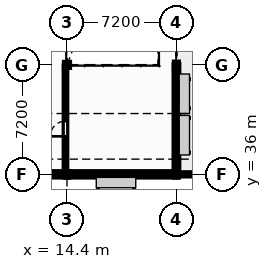
"""IFC4 building model, lengths in metres.
Left out: names, types, materials, properties, quantities, classifications, styles, units other than length and angle.
Written with IfcOpenShell. Run it as: python <this file> out.ifc"""

import sys

from ifc_helpers import new_model, si_unit, direction, frame, frame_2d, origin, origin_2d, place, context, subcontext, project, spatial, rectangle, hollow_circle, i_section, extrude, element, fill, save


model = new_model("IFC4")
c1 = context("Model", 3, precision=1e-05, world=origin(), true_north=direction((0.0, 1.0)))
c2 = subcontext(c1, "Body", "Model", "MODEL_VIEW")
j1 = project(units=[si_unit("LENGTHUNIT", "METRE"), si_unit("PLANEANGLEUNIT", "RADIAN")], contexts=[c1])
p1 = place(None, origin())
s1 = spatial("IfcSite", under=j1, at=p1, CompositionType="ELEMENT")
p2 = place(p1, origin())
s2 = spatial("IfcBuilding", under=s1, at=p2, CompositionType="ELEMENT")
p3 = place(p2, frame((0.0, 0.0, 16.52)))
s3 = spatial("IfcBuildingStorey", under=s2, at=p3, CompositionType="ELEMENT", Elevation=16.52)
p4 = place(p3, frame((14.4, 36.0, 0.0), z_axis=(0.0, 0.0, 1.0), x_axis=(1.0, 0.0, 0.0)))
e1 = element("IfcColumn", 1, at=p4, inside=s3, PredefinedType="COLUMN", context=c2, shape_type="SweptSolid", body=[
    extrude(i_section(OverallWidth=0.254, OverallDepth=0.356, WebThickness=0.01, FlangeThickness=0.018, at=origin_2d()), origin(), (0.0, 0.0, 1.0), 3.74),
])
p5 = place(p3, frame((14.4, 43.2, 0.0), z_axis=(0.0, 0.0, 1.0), x_axis=(1.0, 0.0, 0.0)))
e2 = element("IfcColumn", 2, at=p5, inside=s3, PredefinedType="COLUMN", context=c2, shape_type="SweptSolid", body=[
    extrude(hollow_circle(Radius=0.162, WallThickness=0.012, at=origin_2d()), origin(), (0.0, 0.0, 1.0), 3.74),
])
for number, where, z_axis, x_axis in (
    (3, (21.6, 36.0, 0.0), (0.0, 0.0, 1.0), (1.0, 0.0, 0.0)),
    (4, (21.6, 43.2, 0.0), (0.0, 0.0, 1.0), (1.0, 0.0, 0.0)),
):
    element("IfcColumn", number, at=place(p3, frame(where, z_axis=z_axis, x_axis=x_axis)), inside=s3, PredefinedType="COLUMN", context=c2, shape_type="SweptSolid", body=[
        extrude(i_section(OverallWidth=0.254, OverallDepth=0.356, WebThickness=0.01, FlangeThickness=0.018, at=origin_2d()), origin(), (0.0, 0.0, 1.0), 3.74),
    ])
p6 = place(p3, frame((21.6, 36.0, 0.0), z_axis=(0.0, 0.0, 1.0), x_axis=(0.0, 1.0, 0.0)))
e5 = element("IfcWall", 5, at=p6, inside=s3, PredefinedType="SOLIDWALL", context=c2, shape_type="SweptSolid", body=[
    extrude(rectangle(XDim=7.2, YDim=0.3, at=frame_2d((3.6, 0.0))), origin(), (0.0, 0.0, 1.0), 2.863),
])
p7 = place(p6, frame((1.6, 0.0, 0.643)))
e6 = element("IfcOpeningElement", 6, at=p7, cuts=e5, PredefinedType="OPENING", context=c2, shape_type="SweptSolid", body=[
    extrude(rectangle(XDim=1.95, YDim=2.1, at=frame_2d((0.975, 1.05))), frame((0.0, 0.16, 0.0), z_axis=(0.0, -1.0, 0.0), x_axis=(1.0, 0.0, 0.0)), (0.0, 0.0, 1.0), 0.32),
])
p8 = place(p6, frame((4.5, 0.0, 0.693)))
e7 = element("IfcOpeningElement", 7, at=p8, cuts=e5, PredefinedType="OPENING", context=c2, shape_type="SweptSolid", body=[
    extrude(rectangle(XDim=1.6, YDim=2.05, at=frame_2d((0.8, 1.025))), frame((0.0, 0.16, 0.0), z_axis=(0.0, -1.0, 0.0), x_axis=(1.0, 0.0, 0.0)), (0.0, 0.0, 1.0), 0.32),
])
p9 = place(p3, frame((7.2, 36.0, 0.0), z_axis=(0.0, 0.0, 1.0), x_axis=(1.0, 0.0, 0.0)))
e8 = element("IfcWall", 8, at=p9, inside=s3, PredefinedType="SOLIDWALL", context=c2, shape_type="SweptSolid", body=[
    extrude(rectangle(XDim=7.2, YDim=0.34, at=frame_2d((3.6, 0.0))), origin(), (0.0, 0.0, 1.0), 3.46),
])
p10 = place(p9, frame((4.4, 0.0, 0.9)))
e9 = element("IfcOpeningElement", 9, at=p10, cuts=e8, PredefinedType="OPENING", context=c2, shape_type="SweptSolid", body=[
    extrude(rectangle(XDim=2.05, YDim=1.85, at=frame_2d((1.025, 0.925))), frame((0.0, 0.18, 0.0), z_axis=(0.0, -1.0, 0.0), x_axis=(1.0, 0.0, 0.0)), (0.0, 0.0, 1.0), 0.36),
])
p11 = place(p3, frame((14.4, 36.0, 0.0), z_axis=(0.0, 0.0, 1.0), x_axis=(1.0, 0.0, 0.0)))
e10 = element("IfcWall", 10, at=p11, inside=s3, PredefinedType="SOLIDWALL", context=c2, shape_type="SweptSolid", body=[
    extrude(rectangle(XDim=7.2, YDim=0.34, at=frame_2d((3.6, 0.0))), origin(), (0.0, 0.0, 1.0), 3.46),
])
p12 = place(p11, frame((2.2, 0.0, 0.9)))
e11 = element("IfcOpeningElement", 11, at=p12, cuts=e10, PredefinedType="OPENING", context=c2, shape_type="SweptSolid", body=[
    extrude(rectangle(XDim=2.05, YDim=1.85, at=frame_2d((1.025, 0.925))), frame((0.0, 0.18, 0.0), z_axis=(0.0, -1.0, 0.0), x_axis=(1.0, 0.0, 0.0)), (0.0, 0.0, 1.0), 0.36),
])
p13 = place(p3, frame((21.8, 36.0, 0.0), z_axis=(0.0, 0.0, 1.0), x_axis=(1.0, 0.0, 0.0)))
e12 = element("IfcWall", 12, at=p13, inside=s3, PredefinedType="PARAPET", context=c2, shape_type="SweptSolid", body=[
    extrude(rectangle(XDim=3.6, YDim=0.2, at=frame_2d((1.8, 0.0))), origin(), (0.0, 0.0, 1.0), 0.72),
])
p14 = place(p3, frame((14.3, 36.0, 0.0), z_axis=(0.0, 0.0, 1.0), x_axis=(0.0, 1.0, 0.0)))
e13 = element("IfcWall", 13, at=p14, inside=s3, PredefinedType="PARTITIONING", context=c2, shape_type="SweptSolid", body=[
    extrude(rectangle(XDim=7.12, YDim=0.16, at=frame_2d((3.56, 0.0))), origin(), (0.0, 0.0, 1.0), 2.863),
])
p15 = place(p14, frame((2.5, 0.0, 0.0)))
e14 = element("IfcOpeningElement", 14, at=p15, cuts=e13, PredefinedType="OPENING", context=c2, shape_type="SweptSolid", body=[
    extrude(rectangle(XDim=1.0, YDim=2.15, at=frame_2d((0.5, 1.075))), frame((0.0, 0.09, 0.0), z_axis=(0.0, -1.0, 0.0), x_axis=(1.0, 0.0, 0.0)), (0.0, 0.0, 1.0), 0.18),
])
p16 = place(p7, origin())
e15 = element("IfcWindow", 15, at=p16, inside=s3, PartitioningType="SINGLE_PANEL", PredefinedType="WINDOW", context=c2, shape_type="SweptSolid", body=[
    extrude(rectangle(XDim=1.95, YDim=2.1, at=frame_2d((0.975, 1.05))), frame((0.0, 0.03, 0.0), z_axis=(0.0, -1.0, 0.0), x_axis=(1.0, 0.0, 0.0)), (0.0, 0.0, 1.0), 0.06),
])
fill(e6, e15)
p17 = place(p8, origin())
e16 = element("IfcWindow", 16, at=p17, inside=s3, PartitioningType="SINGLE_PANEL", PredefinedType="WINDOW", context=c2, shape_type="SweptSolid", body=[
    extrude(rectangle(XDim=1.6, YDim=2.05, at=frame_2d((0.8, 1.025))), frame((0.0, 0.03, 0.0), z_axis=(0.0, -1.0, 0.0), x_axis=(1.0, 0.0, 0.0)), (0.0, 0.0, 1.0), 0.06),
])
fill(e7, e16)
p18 = place(p10, origin())
e17 = element("IfcWindow", 17, at=p18, inside=s3, PartitioningType="SINGLE_PANEL", PredefinedType="WINDOW", context=c2, shape_type="SweptSolid", body=[
    extrude(rectangle(XDim=2.05, YDim=1.85, at=frame_2d((1.025, 0.925))), frame((0.0, 0.03, 0.0), z_axis=(0.0, -1.0, 0.0), x_axis=(1.0, 0.0, 0.0)), (0.0, 0.0, 1.0), 0.06),
])
fill(e9, e17)
p19 = place(p12, origin())
e18 = element("IfcWindow", 18, at=p19, inside=s3, PartitioningType="SINGLE_PANEL", PredefinedType="WINDOW", context=c2, shape_type="SweptSolid", body=[
    extrude(rectangle(XDim=2.05, YDim=1.85, at=frame_2d((1.025, 0.925))), frame((0.0, 0.03, 0.0), z_axis=(0.0, -1.0, 0.0), x_axis=(1.0, 0.0, 0.0)), (0.0, 0.0, 1.0), 0.06),
])
fill(e11, e18)
p20 = place(p15, origin())
e19 = element("IfcDoor", 19, at=p20, inside=s3, OperationType="SINGLE_SWING_LEFT", PredefinedType="DOOR", context=c2, shape_type="SweptSolid", body=[
    extrude(rectangle(XDim=1.0, YDim=2.15, at=frame_2d((0.5, 1.075))), frame((0.0, 0.025, 0.0), z_axis=(0.0, -1.0, 0.0), x_axis=(1.0, 0.0, 0.0)), (0.0, 0.0, 1.0), 0.05),
])
fill(e14, e19)
save(model, sys.argv[1])
